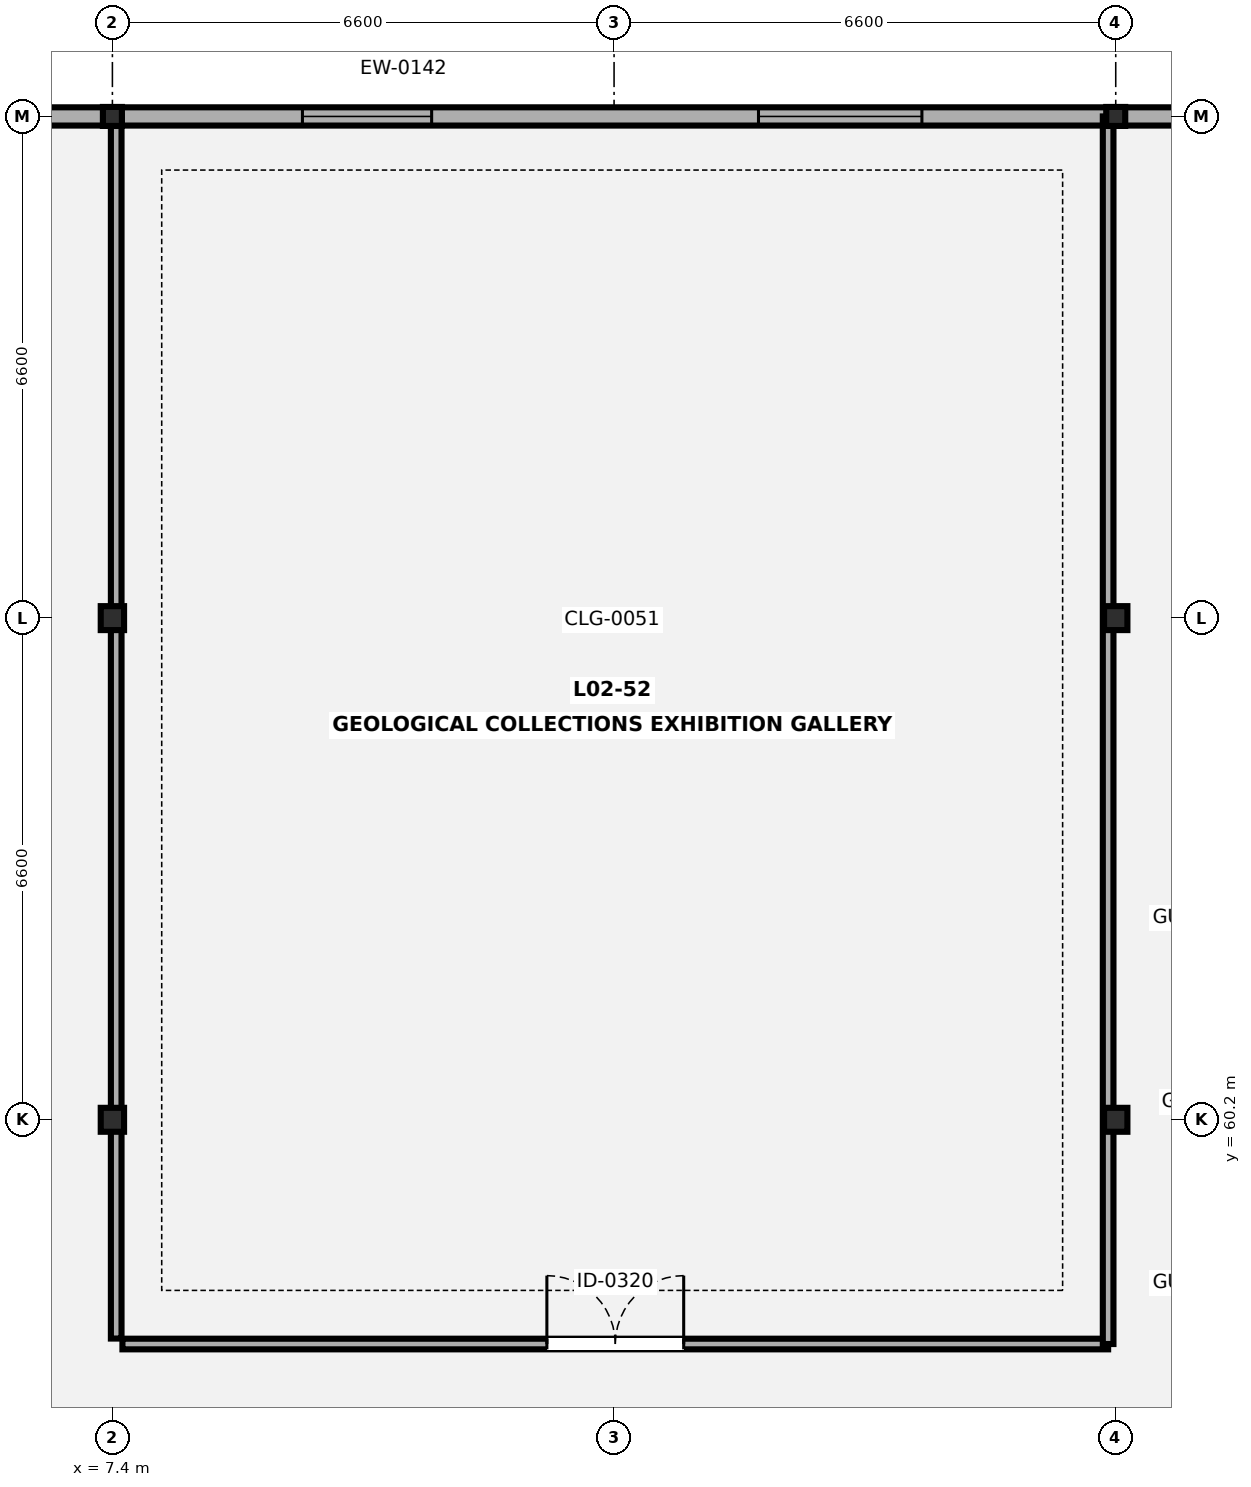
"""IFC4 building model, lengths in metres.
Left out: names, types, materials, properties, quantities, classifications, styles, units other than length and angle.
Written with IfcOpenShell. Run it as: python <this file> out.ifc"""

import sys

from ifc_helpers import new_model, si_unit, direction, frame, frame_2d, origin, origin_2d, place, context, subcontext, project, spatial, rectangle, hollow_rectangle, i_section, extrude, element, fill, save


model = new_model("IFC4")
c1 = context("Model", 3, precision=1e-05, world=origin(), true_north=direction((0.0, 1.0)))
c2 = subcontext(c1, "Body", "Model", "MODEL_VIEW")
j1 = project(units=[si_unit("LENGTHUNIT", "METRE"), si_unit("PLANEANGLEUNIT", "RADIAN")], contexts=[c1])
p1 = place(None, origin())
s1 = spatial("IfcSite", under=j1, at=p1, CompositionType="ELEMENT")
p2 = place(p1, origin())
s2 = spatial("IfcBuilding", under=s1, at=p2, CompositionType="ELEMENT")
p3 = place(p2, frame((0.0, 0.0, 9.1)))
s3 = spatial("IfcBuildingStorey", under=s2, at=p3, CompositionType="ELEMENT", Elevation=9.1)
for number, where, z_axis, x_axis in (
    (1, (7.4, 60.2, 0.0), (0.0, 0.0, 1.0), (1.0, 0.0, 0.0)),
    (2, (7.4, 66.8, 0.0), (0.0, 0.0, 1.0), (1.0, 0.0, 0.0)),
):
    element("IfcColumn", number, at=place(p3, frame(where, z_axis=z_axis, x_axis=x_axis)), inside=s3, PredefinedType="COLUMN", context=c2, shape_type="SweptSolid", body=[
        extrude(i_section(OverallWidth=0.307, OverallDepth=0.315, WebThickness=0.012, FlangeThickness=0.019, FilletRadius=0.017, at=origin_2d()), origin(), (0.0, 0.0, 1.0), 4.2),
    ])
p4 = place(p3, frame((7.4, 73.4, 0.0), z_axis=(0.0, 0.0, 1.0), x_axis=(1.0, 0.0, 0.0)))
e3 = element("IfcColumn", 3, at=p4, inside=s3, PredefinedType="COLUMN", context=c2, shape_type="SweptSolid", body=[
    extrude(hollow_rectangle(XDim=0.25, YDim=0.25, WallThickness=0.012, at=origin_2d()), origin(), (0.0, 0.0, 1.0), 4.2),
])
for number, where, z_axis, x_axis in (
    (4, (20.6, 60.2, 0.0), (0.0, 0.0, 1.0), (1.0, 0.0, 0.0)),
    (5, (20.6, 66.8, 0.0), (0.0, 0.0, 1.0), (1.0, 0.0, 0.0)),
):
    element("IfcColumn", number, at=place(p3, frame(where, z_axis=z_axis, x_axis=x_axis)), inside=s3, PredefinedType="COLUMN", context=c2, shape_type="SweptSolid", body=[
        extrude(i_section(OverallWidth=0.307, OverallDepth=0.315, WebThickness=0.012, FlangeThickness=0.019, FilletRadius=0.017, at=origin_2d()), origin(), (0.0, 0.0, 1.0), 4.2),
    ])
p5 = place(p3, frame((20.6, 73.4, 0.0), z_axis=(0.0, 0.0, 1.0), x_axis=(1.0, 0.0, 0.0)))
e6 = element("IfcColumn", 6, at=p5, inside=s3, PredefinedType="COLUMN", context=c2, shape_type="SweptSolid", body=[
    extrude(hollow_rectangle(XDim=0.25, YDim=0.25, WallThickness=0.012, at=origin_2d()), origin(), (0.0, 0.0, 1.0), 4.2),
])
p6 = place(p3, frame((1.923, 73.4, 0.0), z_axis=(0.0, 0.0, 1.0), x_axis=(1.0, 0.0, 0.0)))
e7 = element("IfcWall", 7, at=p6, inside=s3, PredefinedType="SOLIDWALL", context=c2, shape_type="SweptSolid", body=[
    extrude(rectangle(XDim=25.154, YDim=0.24, at=frame_2d((12.577, 0.0))), origin(), (0.0, 0.0, 1.0), 3.505),
])
p7 = place(p6, frame((7.977, 0.0, 0.85)))
e8 = element("IfcOpeningElement", 8, at=p7, cuts=e7, PredefinedType="OPENING", context=c2, shape_type="SweptSolid", body=[
    extrude(rectangle(XDim=1.7, YDim=1.4, at=frame_2d((0.85, 0.7))), frame((0.0, 0.13, 0.0), z_axis=(0.0, -1.0, 0.0), x_axis=(1.0, 0.0, 0.0)), (0.0, 0.0, 1.0), 0.26),
])
p8 = place(p6, frame((13.977, 0.0, 0.85)))
e9 = element("IfcOpeningElement", 9, at=p8, cuts=e7, PredefinedType="OPENING", context=c2, shape_type="SweptSolid", body=[
    extrude(rectangle(XDim=2.15, YDim=1.4, at=frame_2d((1.075, 0.7))), frame((0.0, 0.13, 0.0), z_axis=(0.0, -1.0, 0.0), x_axis=(1.0, 0.0, 0.0)), (0.0, 0.0, 1.0), 0.26),
])
p9 = place(p3, frame((7.532, 57.25, 0.0), z_axis=(0.0, 0.0, 1.0), x_axis=(1.0, 0.0, 0.0)))
e10 = element("IfcWall", 10, at=p9, inside=s3, PredefinedType="PARTITIONING", context=c2, shape_type="SweptSolid", body=[
    extrude(rectangle(XDim=12.968, YDim=0.14, at=frame_2d((6.484, 0.0))), origin(), (0.0, 0.0, 1.0), 4.0),
])
p10 = place(p9, frame((5.584, 0.0, 0.0)))
e11 = element("IfcOpeningElement", 11, at=p10, cuts=e10, PredefinedType="OPENING", context=c2, shape_type="SweptSolid", body=[
    extrude(rectangle(XDim=1.8, YDim=2.2, at=frame_2d((0.9, 1.1))), frame((0.0, 0.08, 0.0), z_axis=(0.0, -1.0, 0.0), x_axis=(1.0, 0.0, 0.0)), (0.0, 0.0, 1.0), 0.16),
])
p11 = place(p3, frame((7.45, 57.322, 0.0), z_axis=(0.0, 0.0, 1.0), x_axis=(0.0, 1.0, 0.0)))
e12 = element("IfcWall", 12, at=p11, inside=s3, PredefinedType="PARTITIONING", context=c2, shape_type="SweptSolid", body=[
    extrude(rectangle(XDim=16.078, YDim=0.14, at=frame_2d((8.039, 0.0))), origin(), (0.0, 0.0, 1.0), 3.445),
])
p12 = place(p3, frame((20.5, 57.25, 0.0), z_axis=(0.0, 0.0, 1.0), x_axis=(0.0, 1.0, 0.0)))
e13 = element("IfcWall", 13, at=p12, inside=s3, PredefinedType="PARTITIONING", context=c2, shape_type="SweptSolid", body=[
    extrude(rectangle(XDim=16.15, YDim=0.14, at=frame_2d((8.075, 0.0))), origin(), (0.0, 0.0, 1.0), 3.445),
])
p13 = place(p7, origin())
e14 = element("IfcWindow", 14, at=p13, inside=s3, PartitioningType="SINGLE_PANEL", PredefinedType="WINDOW", context=c2, shape_type="SweptSolid", body=[
    extrude(rectangle(XDim=1.7, YDim=1.4, at=frame_2d((0.85, 0.7))), frame((0.0, 0.03, 0.0), z_axis=(0.0, -1.0, 0.0), x_axis=(1.0, 0.0, 0.0)), (0.0, 0.0, 1.0), 0.06),
])
fill(e8, e14)
p14 = place(p8, origin())
e15 = element("IfcWindow", 15, at=p14, inside=s3, PartitioningType="SINGLE_PANEL", PredefinedType="WINDOW", context=c2, shape_type="SweptSolid", body=[
    extrude(rectangle(XDim=2.15, YDim=1.4, at=frame_2d((1.075, 0.7))), frame((0.0, 0.03, 0.0), z_axis=(0.0, -1.0, 0.0), x_axis=(1.0, 0.0, 0.0)), (0.0, 0.0, 1.0), 0.06),
])
fill(e9, e15)
p15 = place(p10, origin())
e16 = element("IfcDoor", 16, at=p15, inside=s3, OperationType="DOUBLE_DOOR_SINGLE_SWING", PredefinedType="DOOR", context=c2, shape_type="SweptSolid", body=[
    extrude(rectangle(XDim=1.8, YDim=2.2, at=frame_2d((0.9, 1.1))), frame((0.0, 0.025, 0.0), z_axis=(0.0, -1.0, 0.0), x_axis=(1.0, 0.0, 0.0)), (0.0, 0.0, 1.0), 0.05),
])
fill(e11, e16)
save(model, sys.argv[1])
